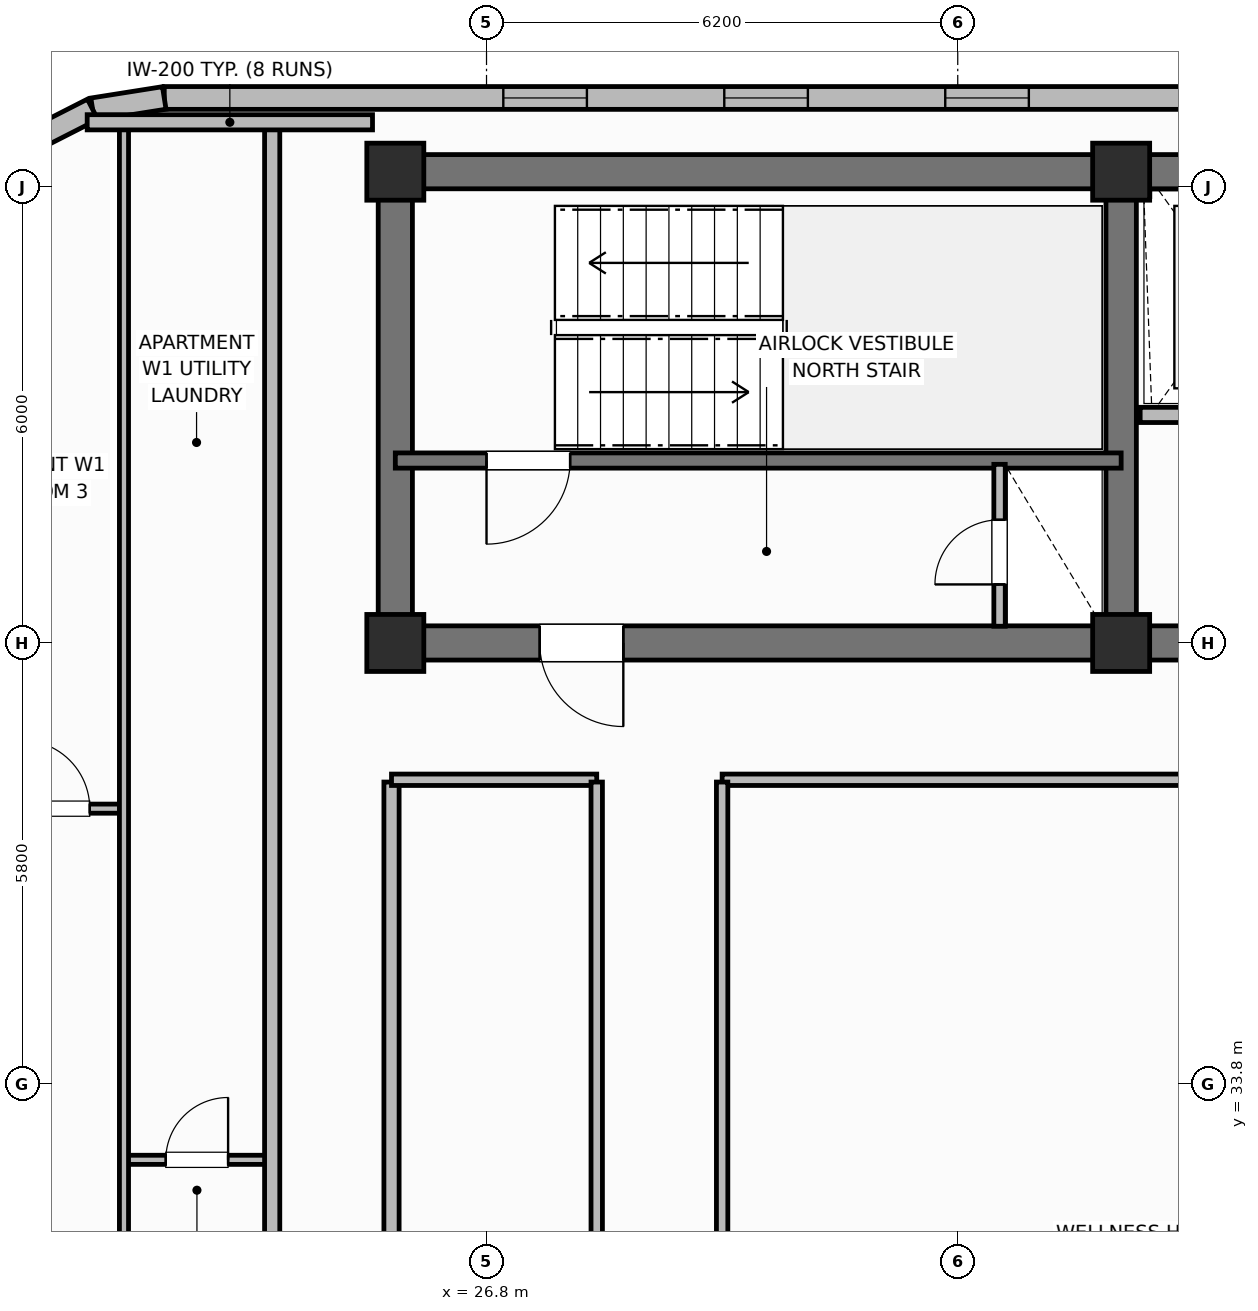
"""IFC4 building model, lengths in metres.
Left out: names, types, materials, properties, quantities, classifications, styles, units other than length and angle.
Written with IfcOpenShell. Run it as: python <this file> out.ifc"""

import sys

from ifc_helpers import new_model, si_unit, direction, frame, frame_2d, origin, origin_2d, place, context, subcontext, project, spatial, rectangle, extrude, element, fill, save


model = new_model("IFC4")
c1 = context("Model", 3, precision=1e-05, world=origin(), true_north=direction((0.0, 1.0)))
c2 = subcontext(c1, "Body", "Model", "MODEL_VIEW")
j1 = project(units=[si_unit("LENGTHUNIT", "METRE"), si_unit("PLANEANGLEUNIT", "RADIAN")], contexts=[c1])
p1 = place(None, origin())
s1 = spatial("IfcSite", under=j1, at=p1, CompositionType="ELEMENT")
p2 = place(p1, origin())
s2 = spatial("IfcBuilding", under=s1, at=p2, CompositionType="ELEMENT")
p3 = place(p2, frame((0.0, 0.0, 260.2)))
s3 = spatial("IfcBuildingStorey", under=s2, at=p3, CompositionType="ELEMENT", Elevation=260.2)
p4 = place(p3, frame((25.6, 45.8, 0.0), z_axis=(0.0, 0.0, 1.0), x_axis=(1.0, 0.0, 0.0)))
e1 = element("IfcWall", 1, at=p4, inside=s3, PredefinedType="SHEAR", context=c2, shape_type="SweptSolid", body=[
    extrude(rectangle(XDim=27.2, YDim=0.45, at=frame_2d((13.6, 0.0))), origin(), (0.0, 0.0, 1.0), 3.7),
])
p5 = place(p3, frame((25.6, 39.825, 0.0), z_axis=(0.0, 0.0, 1.0), x_axis=(0.0, 1.0, 0.0)))
e2 = element("IfcWall", 2, at=p5, inside=s3, PredefinedType="SHEAR", context=c2, shape_type="SweptSolid", body=[
    extrude(rectangle(XDim=5.75, YDim=0.45, at=frame_2d((2.875, 0.0))), origin(), (0.0, 0.0, 1.0), 3.7),
])
p6 = place(p3, frame((52.8, 39.6, 0.0), z_axis=(0.0, 0.0, 1.0), x_axis=(-1.0, 0.0, 0.0)))
e3 = element("IfcWall", 3, at=p6, inside=s3, PredefinedType="SHEAR", context=c2, shape_type="SweptSolid", body=[
    extrude(rectangle(XDim=27.2, YDim=0.45, at=frame_2d((13.6, 0.0))), origin(), (0.0, 0.0, 1.0), 3.7),
])
p7 = place(p6, frame((24.2, 0.0, 0.0)))
e4 = element("IfcOpeningElement", 4, at=p7, cuts=e3, PredefinedType="OPENING", context=c2, shape_type="SweptSolid", body=[
    extrude(rectangle(XDim=1.1, YDim=2.15, at=frame_2d((0.55, 1.075))), frame((0.0, 0.235, 0.0), z_axis=(0.0, -1.0, 0.0), x_axis=(1.0, 0.0, 0.0)), (0.0, 0.0, 1.0), 0.47),
])
p8 = place(p6, frame((15.1, 0.0, 0.0)))
e5 = element("IfcOpeningElement", 5, at=p8, cuts=e3, PredefinedType="OPENING", context=c2, shape_type="SweptSolid", body=[
    extrude(rectangle(XDim=1.2, YDim=2.15, at=frame_2d((0.6, 1.075))), frame((0.0, 0.235, 0.0), z_axis=(0.0, -1.0, 0.0), x_axis=(1.0, 0.0, 0.0)), (0.0, 0.0, 1.0), 0.47),
])
p9 = place(p6, frame((11.6, 0.0, 0.0)))
e6 = element("IfcOpeningElement", 6, at=p9, cuts=e3, PredefinedType="OPENING", context=c2, shape_type="SweptSolid", body=[
    extrude(rectangle(XDim=0.9, YDim=2.1, at=frame_2d((0.45, 1.05))), frame((0.0, 0.235, 0.0), z_axis=(0.0, -1.0, 0.0), x_axis=(1.0, 0.0, 0.0)), (0.0, 0.0, 1.0), 0.47),
])
p10 = place(p6, frame((7.35, 0.0, 0.0)))
e7 = element("IfcOpeningElement", 7, at=p10, cuts=e3, PredefinedType="OPENING", context=c2, shape_type="SweptSolid", body=[
    extrude(rectangle(XDim=0.85, YDim=2.1, at=frame_2d((0.425, 1.05))), frame((0.0, 0.235, 0.0), z_axis=(0.0, -1.0, 0.0), x_axis=(1.0, 0.0, 0.0)), (0.0, 0.0, 1.0), 0.47),
])
p11 = place(p6, frame((4.2, 0.0, 0.0)))
e8 = element("IfcOpeningElement", 8, at=p11, cuts=e3, PredefinedType="OPENING", context=c2, shape_type="SweptSolid", body=[
    extrude(rectangle(XDim=1.3, YDim=2.2, at=frame_2d((0.65, 1.1))), frame((0.0, 0.235, 0.0), z_axis=(0.0, -1.0, 0.0), x_axis=(1.0, 0.0, 0.0)), (0.0, 0.0, 1.0), 0.47),
])
p12 = place(p3, frame((35.15, 39.825, 0.0), z_axis=(0.0, 0.0, 1.0), x_axis=(0.0, 1.0, 0.0)))
e9 = element("IfcWall", 9, at=p12, inside=s3, PredefinedType="SHEAR", context=c2, shape_type="SweptSolid", body=[
    extrude(rectangle(XDim=5.75, YDim=0.4, at=frame_2d((2.875, 0.0))), origin(), (0.0, 0.0, 1.0), 3.7),
])
for number, where, z_axis, x_axis in (
    (10, (25.6, 39.6, 0.0), (0.0, 0.0, 1.0), (1.0, 0.0, 0.0)),
    (11, (25.6, 45.8, 0.0), (0.0, 0.0, 1.0), (1.0, 0.0, 0.0)),
    (12, (35.15, 39.6, 0.0), (0.0, 0.0, 1.0), (1.0, 0.0, 0.0)),
    (13, (35.15, 45.8, 0.0), (0.0, 0.0, 1.0), (1.0, 0.0, 0.0)),
):
    element("IfcColumn", number, at=place(p3, frame(where, z_axis=z_axis, x_axis=x_axis)), inside=s3, PredefinedType="COLUMN", context=c2, shape_type="SweptSolid", body=[
        extrude(rectangle(XDim=0.75, YDim=0.75, at=origin_2d()), origin(), (0.0, 0.0, 1.0), 3.7),
    ])
p13 = place(p3, frame((55.84, 46.77, 0.0), z_axis=(0.0, 0.0, 1.0), x_axis=(-1.0, 0.0, 0.0)))
e14 = element("IfcWall", 14, at=p13, inside=s3, PredefinedType="SOLIDWALL", context=c2, shape_type="SweptSolid", body=[
    extrude(rectangle(XDim=33.28, YDim=0.3, at=frame_2d((16.64, 0.0))), origin(), (0.0, 0.0, 1.0), 2.73),
])
p14 = place(p13, frame((4.461, 0.0, 0.95)))
e15 = element("IfcOpeningElement", 15, at=p14, cuts=e14, PredefinedType="OPENING", context=c2, shape_type="SweptSolid", body=[
    extrude(rectangle(XDim=1.1, YDim=1.65, at=frame_2d((0.55, 0.825))), frame((0.0, 0.16, 0.0), z_axis=(0.0, -1.0, 0.0), x_axis=(1.0, 0.0, 0.0)), (0.0, 0.0, 1.0), 0.32),
])
p15 = place(p13, frame((7.368, 0.0, 0.95)))
e16 = element("IfcOpeningElement", 16, at=p15, cuts=e14, PredefinedType="OPENING", context=c2, shape_type="SweptSolid", body=[
    extrude(rectangle(XDim=1.1, YDim=1.65, at=frame_2d((0.55, 0.825))), frame((0.0, 0.16, 0.0), z_axis=(0.0, -1.0, 0.0), x_axis=(1.0, 0.0, 0.0)), (0.0, 0.0, 1.0), 0.32),
])
p16 = place(p13, frame((10.275, 0.0, 0.95)))
e17 = element("IfcOpeningElement", 17, at=p16, cuts=e14, PredefinedType="OPENING", context=c2, shape_type="SweptSolid", body=[
    extrude(rectangle(XDim=1.1, YDim=1.65, at=frame_2d((0.55, 0.825))), frame((0.0, 0.16, 0.0), z_axis=(0.0, -1.0, 0.0), x_axis=(1.0, 0.0, 0.0)), (0.0, 0.0, 1.0), 0.32),
])
p17 = place(p13, frame((13.883, 0.0, 0.95)))
e18 = element("IfcOpeningElement", 18, at=p17, cuts=e14, PredefinedType="OPENING", context=c2, shape_type="SweptSolid", body=[
    extrude(rectangle(XDim=1.1, YDim=1.65, at=frame_2d((0.55, 0.825))), frame((0.0, 0.16, 0.0), z_axis=(0.0, -1.0, 0.0), x_axis=(1.0, 0.0, 0.0)), (0.0, 0.0, 1.0), 0.32),
])
p18 = place(p13, frame((16.09, 0.0, 0.95)))
e19 = element("IfcOpeningElement", 19, at=p18, cuts=e14, PredefinedType="OPENING", context=c2, shape_type="SweptSolid", body=[
    extrude(rectangle(XDim=1.1, YDim=1.65, at=frame_2d((0.55, 0.825))), frame((0.0, 0.16, 0.0), z_axis=(0.0, -1.0, 0.0), x_axis=(1.0, 0.0, 0.0)), (0.0, 0.0, 1.0), 0.32),
])
p19 = place(p13, frame((18.297, 0.0, 0.95)))
e20 = element("IfcOpeningElement", 20, at=p19, cuts=e14, PredefinedType="OPENING", context=c2, shape_type="SweptSolid", body=[
    extrude(rectangle(XDim=1.1, YDim=1.65, at=frame_2d((0.55, 0.825))), frame((0.0, 0.16, 0.0), z_axis=(0.0, -1.0, 0.0), x_axis=(1.0, 0.0, 0.0)), (0.0, 0.0, 1.0), 0.32),
])
p20 = place(p13, frame((21.905, 0.0, 0.95)))
e21 = element("IfcOpeningElement", 21, at=p20, cuts=e14, PredefinedType="OPENING", context=c2, shape_type="SweptSolid", body=[
    extrude(rectangle(XDim=1.1, YDim=1.65, at=frame_2d((0.55, 0.825))), frame((0.0, 0.16, 0.0), z_axis=(0.0, -1.0, 0.0), x_axis=(1.0, 0.0, 0.0)), (0.0, 0.0, 1.0), 0.32),
])
p21 = place(p13, frame((24.812, 0.0, 0.95)))
e22 = element("IfcOpeningElement", 22, at=p21, cuts=e14, PredefinedType="OPENING", context=c2, shape_type="SweptSolid", body=[
    extrude(rectangle(XDim=1.1, YDim=1.65, at=frame_2d((0.55, 0.825))), frame((0.0, 0.16, 0.0), z_axis=(0.0, -1.0, 0.0), x_axis=(1.0, 0.0, 0.0)), (0.0, 0.0, 1.0), 0.32),
])
p22 = place(p13, frame((27.719, 0.0, 0.95)))
e23 = element("IfcOpeningElement", 23, at=p22, cuts=e14, PredefinedType="OPENING", context=c2, shape_type="SweptSolid", body=[
    extrude(rectangle(XDim=1.1, YDim=1.65, at=frame_2d((0.55, 0.825))), frame((0.0, 0.16, 0.0), z_axis=(0.0, -1.0, 0.0), x_axis=(1.0, 0.0, 0.0)), (0.0, 0.0, 1.0), 0.32),
])
p23 = place(p3, frame((22.56, 46.77, 0.0), z_axis=(0.0, 0.0, 1.0), x_axis=(-0.987669453596, -0.156553666304, 0.0)))
e24 = element("IfcWall", 24, at=p23, inside=s3, PredefinedType="SOLIDWALL", context=c2, shape_type="SweptSolid", body=[
    extrude(rectangle(XDim=0.954, YDim=0.3, at=frame_2d((0.477, 0.0))), origin(), (0.0, 0.0, 1.0), 2.73),
])
p24 = place(p3, frame((21.617, 46.621, 0.0), z_axis=(0.0, 0.0, 1.0), x_axis=(-0.891023873617, -0.45395644796, 0.0)))
e25 = element("IfcWall", 25, at=p24, inside=s3, PredefinedType="SOLIDWALL", context=c2, shape_type="SweptSolid", body=[
    extrude(rectangle(XDim=0.954, YDim=0.3, at=frame_2d((0.477, 0.0))), origin(), (0.0, 0.0, 1.0), 2.73),
])
p25 = place(p3, frame((35.15, 42.0, 0.0), z_axis=(0.0, 0.0, 1.0), x_axis=(-1.0, 0.0, 0.0)))
e26 = element("IfcWall", 26, at=p25, inside=s3, PredefinedType="SHEAR", context=c2, shape_type="SweptSolid", body=[
    extrude(rectangle(XDim=9.55, YDim=0.2, at=frame_2d((4.775, 0.0))), origin(), (0.0, 0.0, 1.0), 3.7),
])
p26 = place(p25, frame((7.25, 0.0, 0.0)))
e27 = element("IfcOpeningElement", 27, at=p26, cuts=e26, PredefinedType="OPENING", context=c2, shape_type="SweptSolid", body=[
    extrude(rectangle(XDim=1.1, YDim=2.15, at=frame_2d((0.55, 1.075))), frame((0.0, 0.11, 0.0), z_axis=(0.0, -1.0, 0.0), x_axis=(1.0, 0.0, 0.0)), (0.0, 0.0, 1.0), 0.22),
])
p27 = place(p3, frame((33.55, 39.82, 0.0), z_axis=(0.0, 0.0, 1.0), x_axis=(0.0, 1.0, 0.0)))
e28 = element("IfcWall", 28, at=p27, inside=s3, PredefinedType="PARTITIONING", context=c2, shape_type="SweptSolid", body=[
    extrude(rectangle(XDim=2.13, YDim=0.15, at=frame_2d((1.065, 0.0))), origin(), (0.0, 0.0, 1.0), 2.56),
])
p28 = place(p27, frame((0.55, 0.0, 0.0)))
e29 = element("IfcOpeningElement", 29, at=p28, cuts=e28, PredefinedType="OPENING", context=c2, shape_type="SweptSolid", body=[
    extrude(rectangle(XDim=0.85, YDim=2.05, at=frame_2d((0.425, 1.025))), frame((0.0, 0.085, 0.0), z_axis=(0.0, -1.0, 0.0), x_axis=(1.0, 0.0, 0.0)), (0.0, 0.0, 1.0), 0.17),
])
p29 = place(p3, frame((37.95, 42.6, 0.0), z_axis=(0.0, 0.0, 1.0), x_axis=(-1.0, 0.0, 0.0)))
e30 = element("IfcWall", 30, at=p29, inside=s3, PredefinedType="PARTITIONING", context=c2, shape_type="SweptSolid", body=[
    extrude(rectangle(XDim=2.55, YDim=0.2, at=frame_2d((1.275, 0.0))), origin(), (0.0, 0.0, 1.0), 2.33),
])
p30 = place(p29, frame((0.75, 0.0, 0.0)))
e31 = element("IfcOpeningElement", 31, at=p30, cuts=e30, PredefinedType="OPENING", context=c2, shape_type="SweptSolid", body=[
    extrude(rectangle(XDim=1.1, YDim=2.15, at=frame_2d((0.55, 1.075))), frame((0.0, 0.11, 0.0), z_axis=(0.0, -1.0, 0.0), x_axis=(1.0, 0.0, 0.0)), (0.0, 0.0, 1.0), 0.22),
])
p31 = place(p3, frame((25.55, 18.63, 0.0), z_axis=(0.0, 0.0, 1.0), x_axis=(0.0, 1.0, 0.0)))
e32 = element("IfcWall", 32, at=p31, inside=s3, PredefinedType="PARTITIONING", context=c2, shape_type="SweptSolid", body=[
    extrude(rectangle(XDim=19.14, YDim=0.2, at=frame_2d((9.57, 0.0))), origin(), (0.0, 0.0, 1.0), 2.56),
])
p32 = place(p3, frame((25.55, 37.8, 0.0), z_axis=(0.0, 0.0, 1.0), x_axis=(1.0, 0.0, 0.0)))
e33 = element("IfcWall", 33, at=p32, inside=s3, PredefinedType="PARTITIONING", context=c2, shape_type="SweptSolid", body=[
    extrude(rectangle(XDim=2.7, YDim=0.15, at=frame_2d((1.35, 0.0))), origin(), (0.0, 0.0, 1.0), 2.56),
])
p33 = place(p3, frame((29.9, 37.8, 0.0), z_axis=(0.0, 0.0, 1.0), x_axis=(1.0, 0.0, 0.0)))
e34 = element("IfcWall", 34, at=p33, inside=s3, PredefinedType="PARTITIONING", context=c2, shape_type="SweptSolid", body=[
    extrude(rectangle(XDim=22.95, YDim=0.15, at=frame_2d((11.475, 0.0))), origin(), (0.0, 0.0, 1.0), 2.56),
])
p34 = place(p3, frame((28.25, 18.63, 0.0), z_axis=(0.0, 0.0, 1.0), x_axis=(0.0, 1.0, 0.0)))
e35 = element("IfcWall", 35, at=p34, inside=s3, PredefinedType="PARTITIONING", context=c2, shape_type="SweptSolid", body=[
    extrude(rectangle(XDim=19.14, YDim=0.15, at=frame_2d((9.57, 0.0))), origin(), (0.0, 0.0, 1.0), 2.56),
])
p35 = place(p34, frame((3.0, 0.0, 0.0)))
e36 = element("IfcOpeningElement", 36, at=p35, cuts=e35, PredefinedType="OPENING", context=c2, shape_type="SweptSolid", body=[
    extrude(rectangle(XDim=0.9, YDim=2.1, at=frame_2d((0.45, 1.05))), frame((0.0, 0.085, 0.0), z_axis=(0.0, -1.0, 0.0), x_axis=(1.0, 0.0, 0.0)), (0.0, 0.0, 1.0), 0.17),
])
p36 = place(p34, frame((11.5, 0.0, 0.0)))
e37 = element("IfcOpeningElement", 37, at=p36, cuts=e35, PredefinedType="OPENING", context=c2, shape_type="SweptSolid", body=[
    extrude(rectangle(XDim=0.9, YDim=2.1, at=frame_2d((0.45, 1.05))), frame((0.0, 0.085, 0.0), z_axis=(0.0, -1.0, 0.0), x_axis=(1.0, 0.0, 0.0)), (0.0, 0.0, 1.0), 0.17),
])
p37 = place(p3, frame((29.9, 18.63, 0.0), z_axis=(0.0, 0.0, 1.0), x_axis=(0.0, 1.0, 0.0)))
e38 = element("IfcWall", 38, at=p37, inside=s3, PredefinedType="PARTITIONING", context=c2, shape_type="SweptSolid", body=[
    extrude(rectangle(XDim=19.14, YDim=0.15, at=frame_2d((9.57, 0.0))), origin(), (0.0, 0.0, 1.0), 2.56),
])
p38 = place(p37, frame((2.2, 0.0, 0.0)))
e39 = element("IfcOpeningElement", 39, at=p38, cuts=e38, PredefinedType="OPENING", context=c2, shape_type="SweptSolid", body=[
    extrude(rectangle(XDim=1.0, YDim=2.15, at=frame_2d((0.5, 1.075))), frame((0.0, 0.085, 0.0), z_axis=(0.0, -1.0, 0.0), x_axis=(1.0, 0.0, 0.0)), (0.0, 0.0, 1.0), 0.17),
])
p39 = place(p37, frame((8.89, 0.0, 0.0)))
e40 = element("IfcOpeningElement", 40, at=p39, cuts=e38, PredefinedType="OPENING", context=c2, shape_type="SweptSolid", body=[
    extrude(rectangle(XDim=1.0, YDim=2.15, at=frame_2d((0.5, 1.075))), frame((0.0, 0.085, 0.0), z_axis=(0.0, -1.0, 0.0), x_axis=(1.0, 0.0, 0.0)), (0.0, 0.0, 1.0), 0.17),
])
p40 = place(p3, frame((22.03, 32.8, 0.0), z_axis=(0.0, 0.0, 1.0), x_axis=(1.0, 0.0, 0.0)))
e41 = element("IfcWall", 41, at=p40, inside=s3, PredefinedType="PARTITIONING", context=c2, shape_type="SweptSolid", body=[
    extrude(rectangle(XDim=1.95, YDim=0.12, at=frame_2d((0.975, 0.0))), origin(), (0.0, 0.0, 1.0), 2.56),
])
p41 = place(p40, frame((0.55, 0.0, 0.0)))
e42 = element("IfcOpeningElement", 42, at=p41, cuts=e41, PredefinedType="OPENING", context=c2, shape_type="SweptSolid", body=[
    extrude(rectangle(XDim=0.82, YDim=2.08, at=frame_2d((0.41, 1.04))), frame((0.0, 0.07, 0.0), z_axis=(0.0, -1.0, 0.0), x_axis=(1.0, 0.0, 0.0)), (0.0, 0.0, 1.0), 0.14),
])
p42 = place(p3, frame((19.53, 37.42, 0.0), z_axis=(0.0, 0.0, 1.0), x_axis=(1.0, 0.0, 0.0)))
e43 = element("IfcWall", 43, at=p42, inside=s3, PredefinedType="PARTITIONING", context=c2, shape_type="SweptSolid", body=[
    extrude(rectangle(XDim=2.5, YDim=0.12, at=frame_2d((1.25, 0.0))), origin(), (0.0, 0.0, 1.0), 2.56),
])
p43 = place(p42, frame((1.15, 0.0, 0.0)))
e44 = element("IfcOpeningElement", 44, at=p43, cuts=e43, PredefinedType="OPENING", context=c2, shape_type="SweptSolid", body=[
    extrude(rectangle(XDim=0.9, YDim=2.1, at=frame_2d((0.45, 1.05))), frame((0.0, 0.07, 0.0), z_axis=(0.0, -1.0, 0.0), x_axis=(1.0, 0.0, 0.0)), (0.0, 0.0, 1.0), 0.14),
])
p44 = place(p3, frame((22.03, 9.99, 0.0), z_axis=(0.0, 0.0, 1.0), x_axis=(0.0, 1.0, 0.0)))
e45 = element("IfcWall", 45, at=p44, inside=s3, PredefinedType="PARTITIONING", context=c2, shape_type="SweptSolid", body=[
    extrude(rectangle(XDim=36.42, YDim=0.12, at=frame_2d((18.21, 0.0))), origin(), (0.0, 0.0, 1.0), 2.56),
])
p45 = place(p44, frame((0.41, 0.0, 0.0)))
e46 = element("IfcOpeningElement", 46, at=p45, cuts=e45, PredefinedType="OPENING", context=c2, shape_type="SweptSolid", body=[
    extrude(rectangle(XDim=0.9, YDim=2.1, at=frame_2d((0.45, 1.05))), frame((0.0, 0.07, 0.0), z_axis=(0.0, -1.0, 0.0), x_axis=(1.0, 0.0, 0.0)), (0.0, 0.0, 1.0), 0.14),
])
p46 = place(p44, frame((15.56, 0.0, 0.0)))
e47 = element("IfcOpeningElement", 47, at=p46, cuts=e45, PredefinedType="OPENING", context=c2, shape_type="SweptSolid", body=[
    extrude(rectangle(XDim=0.82, YDim=2.08, at=frame_2d((0.41, 1.04))), frame((0.0, 0.07, 0.0), z_axis=(0.0, -1.0, 0.0), x_axis=(1.0, 0.0, 0.0)), (0.0, 0.0, 1.0), 0.14),
])
p47 = place(p3, frame((23.98, 9.95, 0.0), z_axis=(0.0, 0.0, 1.0), x_axis=(0.0, 1.0, 0.0)))
e48 = element("IfcWall", 48, at=p47, inside=s3, PredefinedType="PARTITIONING", context=c2, shape_type="SweptSolid", body=[
    extrude(rectangle(XDim=36.5, YDim=0.2, at=frame_2d((18.25, 0.0))), origin(), (0.0, 0.0, 1.0), 2.56),
])
p48 = place(p47, frame((3.25, 0.0, 0.0)))
e49 = element("IfcOpeningElement", 49, at=p48, cuts=e48, PredefinedType="OPENING", context=c2, shape_type="SweptSolid", body=[
    extrude(rectangle(XDim=1.0, YDim=2.15, at=frame_2d((0.5, 1.075))), frame((0.0, 0.11, 0.0), z_axis=(0.0, -1.0, 0.0), x_axis=(1.0, 0.0, 0.0)), (0.0, 0.0, 1.0), 0.22),
])
p49 = place(p3, frame((21.546, 46.45, 0.0), z_axis=(0.0, 0.0, 1.0), x_axis=(1.0, 0.0, 0.0)))
e50 = element("IfcWall", 50, at=p49, inside=s3, PredefinedType="PARTITIONING", context=c2, shape_type="SweptSolid", body=[
    extrude(rectangle(XDim=3.754, YDim=0.2, at=frame_2d((1.877, 0.0))), origin(), (0.0, 0.0, 1.0), 2.56),
])
p50 = place(p20, origin())
e51 = element("IfcWindow", 51, at=p50, inside=s3, PartitioningType="SINGLE_PANEL", PredefinedType="WINDOW", context=c2, shape_type="SweptSolid", body=[
    extrude(rectangle(XDim=1.1, YDim=1.65, at=frame_2d((0.55, 0.825))), frame((0.0, 0.03, 0.0), z_axis=(0.0, -1.0, 0.0), x_axis=(1.0, 0.0, 0.0)), (0.0, 0.0, 1.0), 0.06),
])
fill(e21, e51)
p51 = place(p21, origin())
e52 = element("IfcWindow", 52, at=p51, inside=s3, PartitioningType="SINGLE_PANEL", PredefinedType="WINDOW", context=c2, shape_type="SweptSolid", body=[
    extrude(rectangle(XDim=1.1, YDim=1.65, at=frame_2d((0.55, 0.825))), frame((0.0, 0.03, 0.0), z_axis=(0.0, -1.0, 0.0), x_axis=(1.0, 0.0, 0.0)), (0.0, 0.0, 1.0), 0.06),
])
fill(e22, e52)
p52 = place(p22, origin())
e53 = element("IfcWindow", 53, at=p52, inside=s3, PartitioningType="SINGLE_PANEL", PredefinedType="WINDOW", context=c2, shape_type="SweptSolid", body=[
    extrude(rectangle(XDim=1.1, YDim=1.65, at=frame_2d((0.55, 0.825))), frame((0.0, 0.03, 0.0), z_axis=(0.0, -1.0, 0.0), x_axis=(1.0, 0.0, 0.0)), (0.0, 0.0, 1.0), 0.06),
])
fill(e23, e53)
p53 = place(p26, origin())
e54 = element("IfcDoor", 54, at=p53, inside=s3, OperationType="SINGLE_SWING_RIGHT", PredefinedType="DOOR", context=c2, shape_type="SweptSolid", body=[
    extrude(rectangle(XDim=1.1, YDim=2.15, at=frame_2d((0.55, 1.075))), frame((0.0, 0.025, 0.0), z_axis=(0.0, -1.0, 0.0), x_axis=(1.0, 0.0, 0.0)), (0.0, 0.0, 1.0), 0.05),
])
fill(e27, e54)
p54 = place(p28, origin())
e55 = element("IfcDoor", 55, at=p54, inside=s3, OperationType="SINGLE_SWING_LEFT", PredefinedType="TRAPDOOR", context=c2, shape_type="SweptSolid", body=[
    extrude(rectangle(XDim=0.85, YDim=2.05, at=frame_2d((0.425, 1.025))), frame((0.0, 0.025, 0.0), z_axis=(0.0, -1.0, 0.0), x_axis=(1.0, 0.0, 0.0)), (0.0, 0.0, 1.0), 0.05),
])
fill(e29, e55)
p55 = place(p41, origin())
e56 = element("IfcDoor", 56, at=p55, inside=s3, OperationType="SINGLE_SWING_RIGHT", PredefinedType="DOOR", context=c2, shape_type="SweptSolid", body=[
    extrude(rectangle(XDim=0.82, YDim=2.08, at=frame_2d((0.41, 1.04))), frame((0.0, 0.025, 0.0), z_axis=(0.0, -1.0, 0.0), x_axis=(1.0, 0.0, 0.0)), (0.0, 0.0, 1.0), 0.05),
])
fill(e42, e56)
p56 = place(p43, origin())
e57 = element("IfcDoor", 57, at=p56, inside=s3, OperationType="SINGLE_SWING_LEFT", PredefinedType="DOOR", context=c2, shape_type="SweptSolid", body=[
    extrude(rectangle(XDim=0.9, YDim=2.1, at=frame_2d((0.45, 1.05))), frame((0.0, 0.025, 0.0), z_axis=(0.0, -1.0, 0.0), x_axis=(1.0, 0.0, 0.0)), (0.0, 0.0, 1.0), 0.05),
])
fill(e44, e57)
p57 = place(p7, origin())
e58 = element("IfcDoor", 58, at=p57, inside=s3, OperationType="SINGLE_SWING_LEFT", PredefinedType="DOOR", context=c2, shape_type="SweptSolid", body=[
    extrude(rectangle(XDim=1.1, YDim=2.15, at=frame_2d((0.55, 1.075))), frame((0.0, 0.025, 0.0), z_axis=(0.0, -1.0, 0.0), x_axis=(1.0, 0.0, 0.0)), (0.0, 0.0, 1.0), 0.05),
])
fill(e4, e58)
save(model, sys.argv[1])
